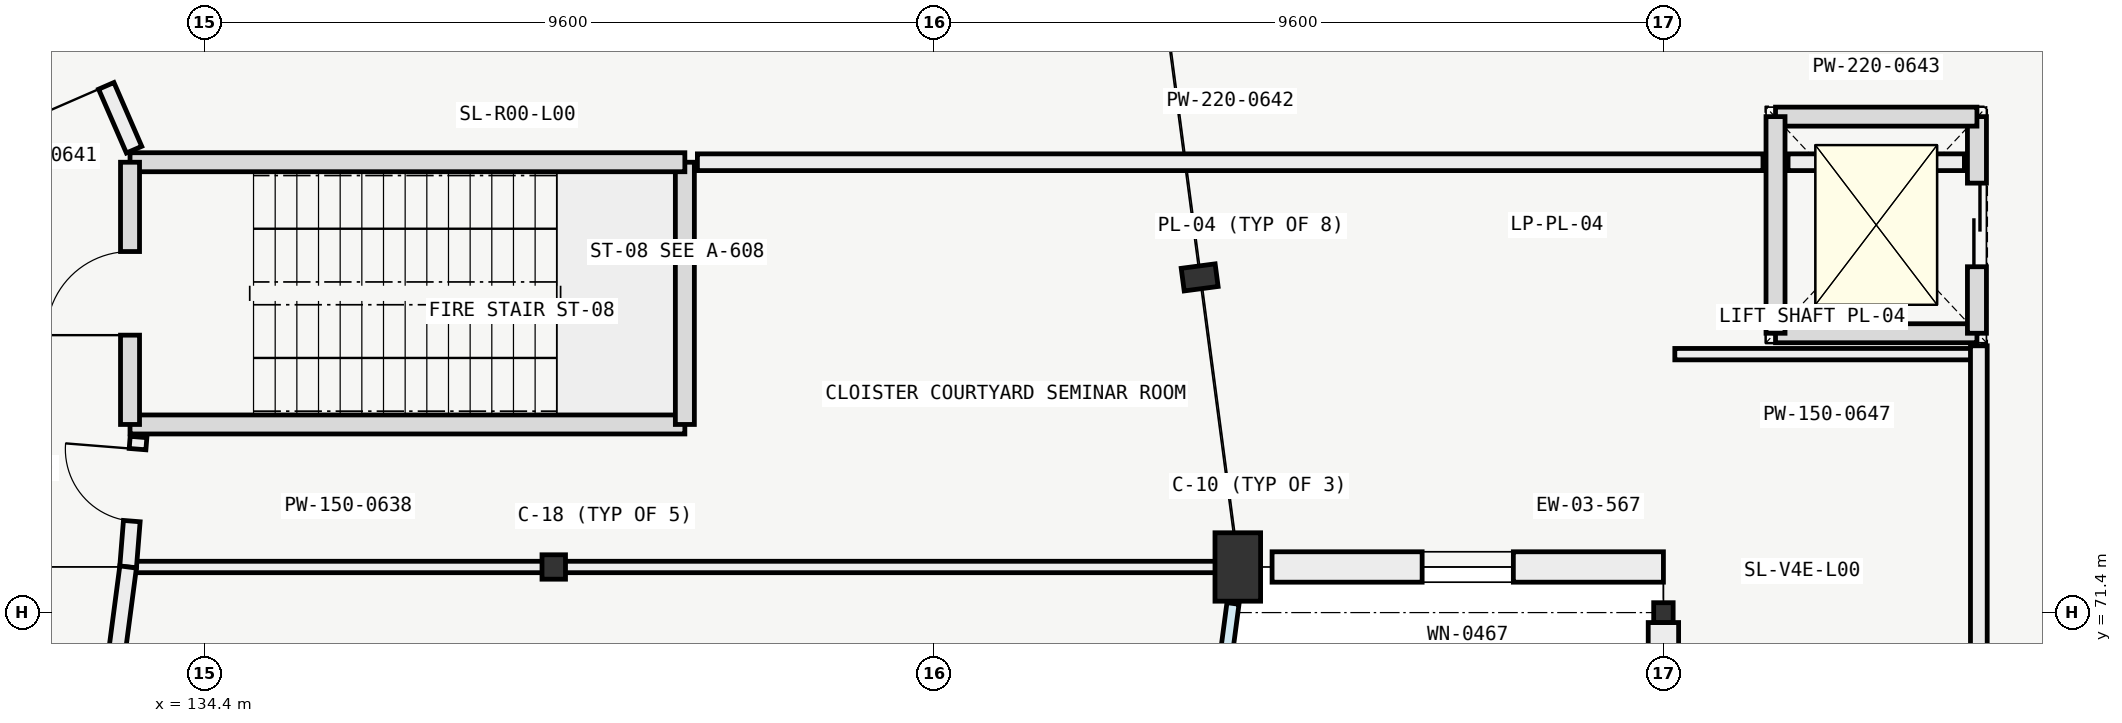
"""IFC4 building model, lengths in metres.
Left out: names, types, materials, properties, quantities, classifications, styles, units other than length and angle.
Written with IfcOpenShell. Run it as: python <this file> out.ifc"""

import sys

from ifc_helpers import new_model, si_unit, direction, frame, frame_2d, origin, origin_2d, place, context, subcontext, project, spatial, rectangle, i_section, extrude, element, fill, save


model = new_model("IFC4")
c1 = context("Model", 3, precision=1e-05, world=origin(), true_north=direction((0.0, 1.0)))
c2 = subcontext(c1, "Body", "Model", "MODEL_VIEW")
j1 = project(units=[si_unit("LENGTHUNIT", "METRE"), si_unit("PLANEANGLEUNIT", "RADIAN")], contexts=[c1])
p1 = place(None, origin())
s1 = spatial("IfcSite", under=j1, at=p1, CompositionType="ELEMENT")
p2 = place(p1, origin())
s2 = spatial("IfcBuilding", under=s1, at=p2, CompositionType="ELEMENT")
p3 = place(p2, origin())
s3 = spatial("IfcBuildingStorey", under=s2, at=p3, CompositionType="ELEMENT", Elevation=0.0)
p4 = place(p3, frame((139.0, 72.0, -0.4), z_axis=(0.0, 0.0, 1.0), x_axis=(1.0, 0.0, 0.0)))
e1 = element("IfcColumn", 1, at=p4, inside=s3, PredefinedType="COLUMN", context=c2, shape_type="SweptSolid", body=[
    extrude(i_section(OverallWidth=0.309, OverallDepth=0.321, WebThickness=0.014, FlangeThickness=0.022, FilletRadius=0.017, at=origin_2d()), origin(), (0.0, 0.0, 1.0), 5.8),
])
p5 = place(p3, frame((148.0, 72.0, -0.4), z_axis=(0.0, 0.0, 1.0), x_axis=(1.0, 0.0, 0.0)))
e2 = element("IfcColumn", 2, at=p5, inside=s3, PredefinedType="COLUMN", context=c2, shape_type="SweptSolid", body=[
    extrude(rectangle(XDim=0.6, YDim=0.9, at=origin_2d()), origin(), (0.0, 0.0, 1.0), 5.8),
])
p6 = place(p3, frame((147.498, 75.81, -0.4), z_axis=(0.0, 0.0, 1.0), x_axis=(-0.13052619222, 0.991444861374, 0.0)))
e3 = element("IfcColumn", 3, at=p6, inside=s3, PredefinedType="PILASTER", context=c2, shape_type="SweptSolid", body=[
    extrude(rectangle(XDim=0.3, YDim=0.45, at=origin_2d()), origin(), (0.0, 0.0, 1.0), 5.8),
])
p7 = place(p3, frame((153.6, 71.4, -0.4), z_axis=(0.0, 0.0, 1.0), x_axis=(1.0, 0.0, 0.0)))
e4 = element("IfcColumn", 4, at=p7, inside=s3, PredefinedType="COLUMN", context=c2, shape_type="SweptSolid", body=[
    extrude(i_section(OverallWidth=0.256, OverallDepth=0.26, WebThickness=0.01, FlangeThickness=0.017, FilletRadius=0.014, at=origin_2d()), origin(), (0.0, 0.0, 1.0), 5.8),
])
p8 = place(p3, frame((153.6, 61.331, 0.0), z_axis=(0.0, 0.0, 1.0), x_axis=(0.0, 1.0, 0.0)))
e5 = element("IfcWall", 5, at=p8, inside=s3, PredefinedType="SOLIDWALL", context=c2, shape_type="SweptSolid", body=[
    extrude(rectangle(XDim=9.938, YDim=0.4, at=frame_2d((4.969, 0.0))), origin(), (0.0, 0.0, 1.0), 4.694),
])
p9 = place(p8, frame((3.919, 0.0, 0.85)))
e6 = element("IfcOpeningElement", 6, at=p9, cuts=e5, PredefinedType="OPENING", context=c2, shape_type="SweptSolid", body=[
    extrude(rectangle(XDim=2.1, YDim=2.4, at=frame_2d((1.05, 1.2))), frame((0.0, 0.21, 0.0), z_axis=(0.0, -1.0, 0.0), x_axis=(1.0, 0.0, 0.0)), (0.0, 0.0, 1.0), 0.42),
])
p10 = place(p3, frame((153.6, 72.0, 0.0), z_axis=(0.0, 0.0, 1.0), x_axis=(-1.0, 0.0, 0.0)))
e7 = element("IfcWall", 7, at=p10, inside=s3, PredefinedType="SOLIDWALL", context=c2, shape_type="SweptSolid", body=[
    extrude(rectangle(XDim=5.149, YDim=0.4, at=frame_2d((2.575, 0.0))), origin(), (0.0, 0.0, 1.0), 4.694),
])
p11 = place(p10, frame((1.975, 0.0, 0.9)))
e8 = element("IfcOpeningElement", 8, at=p11, cuts=e7, PredefinedType="OPENING", context=c2, shape_type="SweptSolid", body=[
    extrude(rectangle(XDim=1.2, YDim=1.8, at=frame_2d((0.6, 0.9))), frame((0.0, 0.21, 0.0), z_axis=(0.0, -1.0, 0.0), x_axis=(1.0, 0.0, 0.0)), (0.0, 0.0, 1.0), 0.42),
])
p12 = place(p3, frame((133.425, 73.875, -0.4), z_axis=(0.0, 0.0, 1.0), x_axis=(1.0, 0.0, 0.0)))
e9 = element("IfcWall", 9, at=p12, inside=s3, PredefinedType="SOLIDWALL", context=c2, shape_type="SweptSolid", body=[
    extrude(rectangle(XDim=7.3, YDim=0.25, at=frame_2d((3.65, 0.0))), origin(), (0.0, 0.0, 1.0), 5.52),
])
p13 = place(p3, frame((140.725, 73.875, -0.4), z_axis=(0.0, 0.0, 1.0), x_axis=(0.0, 1.0, 0.0)))
e10 = element("IfcWall", 10, at=p13, inside=s3, PredefinedType="SOLIDWALL", context=c2, shape_type="SweptSolid", body=[
    extrude(rectangle(XDim=3.45, YDim=0.25, at=frame_2d((1.725, 0.0))), origin(), (0.0, 0.0, 1.0), 5.52),
])
p14 = place(p3, frame((140.725, 77.325, -0.4), z_axis=(0.0, 0.0, 1.0), x_axis=(-1.0, 0.0, 0.0)))
e11 = element("IfcWall", 11, at=p14, inside=s3, PredefinedType="SOLIDWALL", context=c2, shape_type="SweptSolid", body=[
    extrude(rectangle(XDim=7.3, YDim=0.25, at=frame_2d((3.65, 0.0))), origin(), (0.0, 0.0, 1.0), 5.52),
])
p15 = place(p3, frame((133.425, 73.875, -0.4), z_axis=(0.0, 0.0, 1.0), x_axis=(0.0, 1.0, 0.0)))
e12 = element("IfcWall", 12, at=p15, inside=s3, PredefinedType="SOLIDWALL", context=c2, shape_type="SweptSolid", body=[
    extrude(rectangle(XDim=3.45, YDim=0.25, at=frame_2d((1.725, 0.0))), origin(), (0.0, 0.0, 1.0), 5.52),
])
p16 = place(p15, frame((1.175, 0.0, 0.4)))
e13 = element("IfcOpeningElement", 13, at=p16, cuts=e12, PredefinedType="OPENING", context=c2, shape_type="SweptSolid", body=[
    extrude(rectangle(XDim=1.1, YDim=2.2, at=frame_2d((0.55, 1.1))), frame((0.0, 0.135, 0.0), z_axis=(0.0, -1.0, 0.0), x_axis=(1.0, 0.0, 0.0)), (0.0, 0.0, 1.0), 0.27),
])
p17 = place(p3, frame((155.075, 75.075, -0.25), z_axis=(0.0, 0.0, 1.0), x_axis=(1.0, 0.0, 0.0)))
e14 = element("IfcWall", 14, at=p17, inside=s3, PredefinedType="SOLIDWALL", context=c2, shape_type="SweptSolid", body=[
    extrude(rectangle(XDim=2.65, YDim=0.25, at=frame_2d((1.325, 0.0))), origin(), (0.0, 0.0, 1.0), 5.37),
])
p18 = place(p3, frame((157.725, 75.075, -0.25), z_axis=(0.0, 0.0, 1.0), x_axis=(0.0, 1.0, 0.0)))
e15 = element("IfcWall", 15, at=p18, inside=s3, PredefinedType="SOLIDWALL", context=c2, shape_type="SweptSolid", body=[
    extrude(rectangle(XDim=2.85, YDim=0.25, at=frame_2d((1.425, 0.0))), origin(), (0.0, 0.0, 1.0), 5.37),
])
p19 = place(p18, frame((0.875, 0.0, 0.25)))
e16 = element("IfcOpeningElement", 16, at=p19, cuts=e15, PredefinedType="OPENING", context=c2, shape_type="SweptSolid", body=[
    extrude(rectangle(XDim=1.1, YDim=2.1, at=frame_2d((0.55, 1.05))), frame((0.0, 0.135, 0.0), z_axis=(0.0, -1.0, 0.0), x_axis=(1.0, 0.0, 0.0)), (0.0, 0.0, 1.0), 0.27),
])
p20 = place(p3, frame((157.725, 77.925, -0.25), z_axis=(0.0, 0.0, 1.0), x_axis=(-1.0, 0.0, 0.0)))
e17 = element("IfcWall", 17, at=p20, inside=s3, PredefinedType="SOLIDWALL", context=c2, shape_type="SweptSolid", body=[
    extrude(rectangle(XDim=2.65, YDim=0.25, at=frame_2d((1.325, 0.0))), origin(), (0.0, 0.0, 1.0), 5.37),
])
p21 = place(p3, frame((155.075, 77.925, -0.25), z_axis=(0.0, 0.0, 1.0), x_axis=(0.0, -1.0, 0.0)))
e18 = element("IfcWall", 18, at=p21, inside=s3, PredefinedType="SOLIDWALL", context=c2, shape_type="SweptSolid", body=[
    extrude(rectangle(XDim=2.85, YDim=0.25, at=frame_2d((1.425, 0.0))), origin(), (0.0, 0.0, 1.0), 5.37),
])
p22 = place(p3, frame((133.4, 72.0, 0.0), z_axis=(0.0, 0.0, 1.0), x_axis=(1.0, 0.0, 0.0)))
e19 = element("IfcWall", 19, at=p22, inside=s3, PredefinedType="PARTITIONING", context=c2, shape_type="SweptSolid", body=[
    extrude(rectangle(XDim=14.48, YDim=0.15, at=frame_2d((7.24, 0.0))), origin(), (0.0, 0.0, 1.0), 4.567),
])
p23 = place(p3, frame((133.4, 72.0, 0.0), z_axis=(0.0, 0.0, 1.0), x_axis=(0.07984138391, 0.996807580938, 0.0)))
e20 = element("IfcWall", 20, at=p23, inside=s3, PredefinedType="PARTITIONING", context=c2, shape_type="SweptSolid", body=[
    extrude(rectangle(XDim=1.715, YDim=0.22, at=frame_2d((0.858, 0.0))), origin(), (0.0, 0.0, 1.0), 4.567),
])
p24 = place(p23, frame((0.605, 0.0, 0.0)))
e21 = element("IfcOpeningElement", 21, at=p24, cuts=e20, PredefinedType="OPENING", context=c2, shape_type="SweptSolid", body=[
    extrude(rectangle(XDim=0.95, YDim=2.1, at=frame_2d((0.475, 1.05))), frame((0.0, 0.12, 0.0), z_axis=(0.0, -1.0, 0.0), x_axis=(1.0, 0.0, 0.0)), (0.0, 0.0, 1.0), 0.24),
])
p25 = place(p3, frame((133.478, 77.49, 0.0), z_axis=(0.0, 0.0, 1.0), x_axis=(-0.399219580964, 0.916855346374, 0.0)))
e22 = element("IfcWall", 22, at=p25, inside=s3, PredefinedType="PARTITIONING", context=c2, shape_type="SweptSolid", body=[
    extrude(rectangle(XDim=2.876, YDim=0.22, at=frame_2d((1.438, 0.0))), origin(), (0.0, 0.0, 1.0), 4.567),
])
p26 = place(p25, frame((0.916, 0.0, 0.0)))
e23 = element("IfcOpeningElement", 23, at=p26, cuts=e22, PredefinedType="OPENING", context=c2, shape_type="SweptSolid", body=[
    extrude(rectangle(XDim=1.8, YDim=2.2, at=frame_2d((0.9, 1.1))), frame((0.0, 0.12, 0.0), z_axis=(0.0, -1.0, 0.0), x_axis=(1.0, 0.0, 0.0)), (0.0, 0.0, 1.0), 0.24),
])
p27 = place(p3, frame((140.89, 77.325, 0.0), z_axis=(0.0, 0.0, 1.0), x_axis=(1.0, 0.0, 0.0)))
e24 = element("IfcWall", 24, at=p27, inside=s3, PredefinedType="PARTITIONING", context=c2, shape_type="SweptSolid", body=[
    extrude(rectangle(XDim=14.02, YDim=0.22, at=frame_2d((7.01, 0.0))), origin(), (0.0, 0.0, 1.0), 4.643),
])
p28 = place(p3, frame((155.24, 77.325, 0.0), z_axis=(0.0, 0.0, 1.0), x_axis=(1.0, 0.0, 0.0)))
e25 = element("IfcWall", 25, at=p28, inside=s3, PredefinedType="PARTITIONING", context=c2, shape_type="SweptSolid", body=[
    extrude(rectangle(XDim=2.32, YDim=0.22, at=frame_2d((1.16, 0.0))), origin(), (0.0, 0.0, 1.0), 5.05),
])
p29 = place(p3, frame((153.75, 74.8, 0.0), z_axis=(0.0, 0.0, 1.0), x_axis=(1.0, 0.0, 0.0)))
e26 = element("IfcWall", 26, at=p29, inside=s3, PredefinedType="PARTITIONING", context=c2, shape_type="SweptSolid", body=[
    extrude(rectangle(XDim=4.0, YDim=0.15, at=frame_2d((2.0, 0.0))), origin(), (0.0, 0.0, 1.0), 5.05),
])
p30 = place(p3, frame((157.75, 51.15, 0.0), z_axis=(0.0, 0.0, 1.0), x_axis=(0.0, 1.0, 0.0)))
e27 = element("IfcWall", 27, at=p30, inside=s3, PredefinedType="PARTITIONING", context=c2, shape_type="SweptSolid", body=[
    extrude(rectangle(XDim=23.76, YDim=0.22, at=frame_2d((11.88, 0.0))), origin(), (0.0, 0.0, 1.0), 4.64),
])
p31 = place(p30, frame((12.0, 0.0, 0.0)))
e28 = element("IfcOpeningElement", 28, at=p31, cuts=e27, PredefinedType="OPENING", context=c2, shape_type="SweptSolid", body=[
    extrude(rectangle(XDim=1.5, YDim=2.2, at=frame_2d((0.75, 1.1))), frame((0.0, 0.12, 0.0), z_axis=(0.0, -1.0, 0.0), x_axis=(1.0, 0.0, 0.0)), (0.0, 0.0, 1.0), 0.24),
])
p32 = place(p3, frame((132.33, 63.873, 0.0), z_axis=(0.0, 0.0, 1.0), x_axis=(0.130513066404, 0.991446589332, 0.0)))
e29 = element("IfcWall", 29, at=p32, inside=s3, PredefinedType="PARTITIONING", context=c2, shape_type="SweptSolid", body=[
    extrude(rectangle(XDim=8.197, YDim=0.22, at=frame_2d((4.099, 0.0))), origin(), (0.0, 0.0, 1.0), 4.567),
])
p33 = place(p11, origin())
e30 = element("IfcWindow", 30, at=p33, inside=s3, PartitioningType="SINGLE_PANEL", PredefinedType="WINDOW", context=c2, shape_type="SweptSolid", body=[
    extrude(rectangle(XDim=1.2, YDim=1.8, at=frame_2d((0.6, 0.9))), frame((0.0, 0.03, 0.0), z_axis=(0.0, -1.0, 0.0), x_axis=(1.0, 0.0, 0.0)), (0.0, 0.0, 1.0), 0.06),
])
fill(e8, e30)
p34 = place(p16, origin())
e31 = element("IfcDoor", 31, at=p34, inside=s3, OperationType="SINGLE_SWING_LEFT", PredefinedType="DOOR", context=c2, shape_type="SweptSolid", body=[
    extrude(rectangle(XDim=1.1, YDim=2.2, at=frame_2d((0.55, 1.1))), frame((0.0, 0.025, 0.0), z_axis=(0.0, -1.0, 0.0), x_axis=(1.0, 0.0, 0.0)), (0.0, 0.0, 1.0), 0.05),
])
fill(e13, e31)
p35 = place(p19, origin())
e32 = element("IfcDoor", 32, at=p35, inside=s3, OperationType="SLIDING_TO_LEFT", PredefinedType="DOOR", context=c2, shape_type="SweptSolid", body=[
    extrude(rectangle(XDim=1.1, YDim=2.1, at=frame_2d((0.55, 1.05))), frame((0.0, 0.025, 0.0), z_axis=(0.0, -1.0, 0.0), x_axis=(1.0, 0.0, 0.0)), (0.0, 0.0, 1.0), 0.05),
])
fill(e16, e32)
p36 = place(p24, origin())
e33 = element("IfcDoor", 33, at=p36, inside=s3, OperationType="SINGLE_SWING_RIGHT", PredefinedType="DOOR", context=c2, shape_type="SweptSolid", body=[
    extrude(rectangle(XDim=0.95, YDim=2.1, at=frame_2d((0.475, 1.05))), frame((0.0, 0.025, 0.0), z_axis=(0.0, -1.0, 0.0), x_axis=(1.0, 0.0, 0.0)), (0.0, 0.0, 1.0), 0.05),
])
fill(e21, e33)
p37 = place(p26, origin())
e34 = element("IfcDoor", 34, at=p37, inside=s3, OperationType="DOUBLE_DOOR_SINGLE_SWING", PredefinedType="DOOR", context=c2, shape_type="SweptSolid", body=[
    extrude(rectangle(XDim=1.8, YDim=2.2, at=frame_2d((0.9, 1.1))), frame((0.0, 0.025, 0.0), z_axis=(0.0, -1.0, 0.0), x_axis=(1.0, 0.0, 0.0)), (0.0, 0.0, 1.0), 0.05),
])
fill(e23, e34)
save(model, sys.argv[1])
